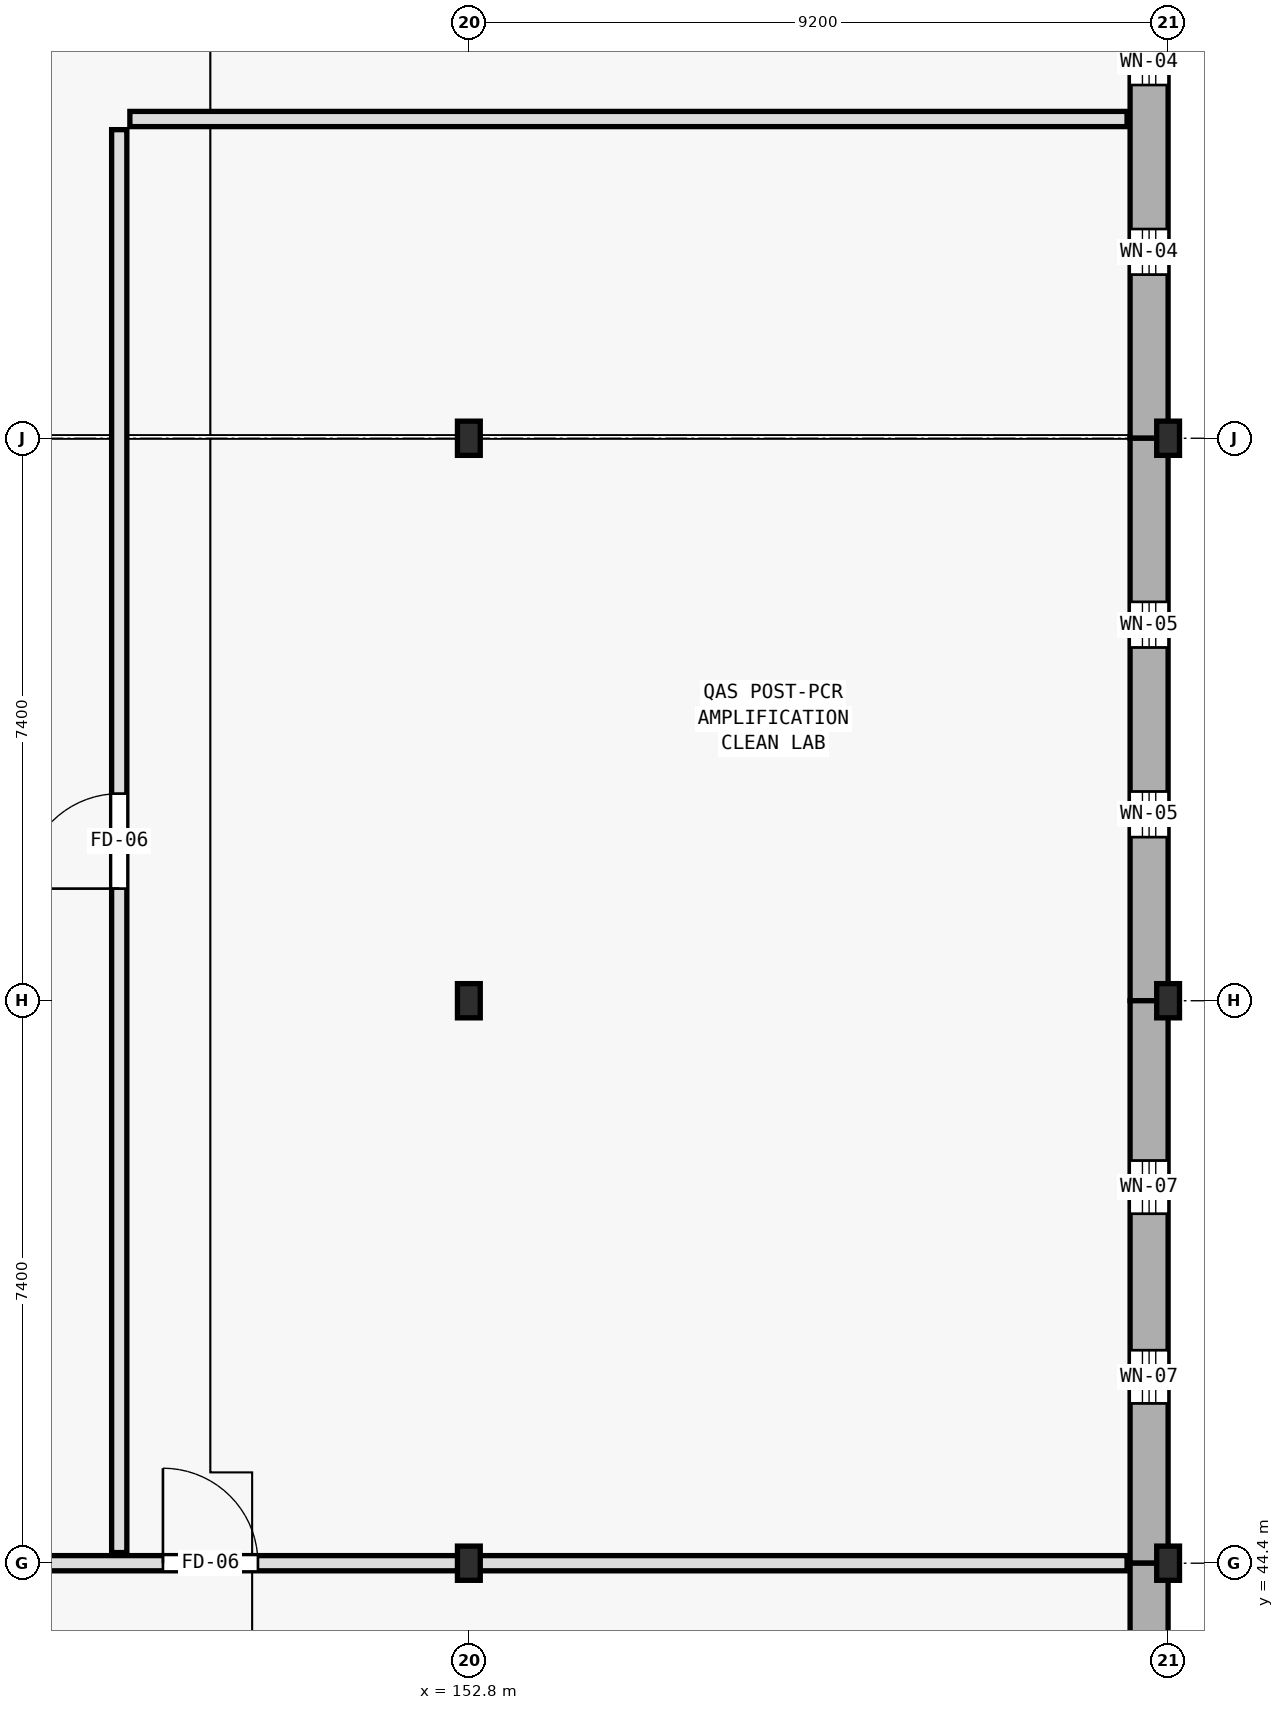
"""IFC4 building model, lengths in metres.
Left out: names, types, materials, properties, quantities, classifications, styles, units other than length and angle.
Written with IfcOpenShell. Run it as: python <this file> out.ifc"""

import sys

from ifc_helpers import new_model, si_unit, direction, frame, frame_2d, origin, origin_2d, place, context, subcontext, project, spatial, rectangle, i_section, extrude, element, fill, save


model = new_model("IFC4")
c1 = context("Model", 3, precision=1e-05, world=origin(), true_north=direction((0.0, 1.0)))
c2 = subcontext(c1, "Body", "Model", "MODEL_VIEW")
j1 = project(units=[si_unit("LENGTHUNIT", "METRE"), si_unit("PLANEANGLEUNIT", "RADIAN")], contexts=[c1])
p1 = place(None, origin())
s1 = spatial("IfcSite", under=j1, at=p1, CompositionType="ELEMENT")
p2 = place(p1, origin())
s2 = spatial("IfcBuilding", under=s1, at=p2, CompositionType="ELEMENT")
p3 = place(p2, frame((0.0, 0.0, 9.9)))
s3 = spatial("IfcBuildingStorey", under=s2, at=p3, CompositionType="ELEMENT", Elevation=9.9)
for number, where, z_axis, x_axis in (
    (1, (152.8, 44.4, 0.0), (0.0, 0.0, 1.0), (1.0, 0.0, 0.0)),
    (2, (152.8, 51.8, 0.0), (0.0, 0.0, 1.0), (1.0, 0.0, 0.0)),
    (3, (152.8, 59.2, 0.0), (0.0, 0.0, 1.0), (1.0, 0.0, 0.0)),
    (4, (162.0, 44.4, 0.0), (0.0, 0.0, 1.0), (1.0, 0.0, 0.0)),
    (5, (162.0, 51.8, 0.0), (0.0, 0.0, 1.0), (1.0, 0.0, 0.0)),
    (6, (162.0, 59.2, 0.0), (0.0, 0.0, 1.0), (1.0, 0.0, 0.0)),
):
    element("IfcColumn", number, at=place(p3, frame(where, z_axis=z_axis, x_axis=x_axis)), inside=s3, PredefinedType="COLUMN", context=c2, shape_type="SweptSolid", body=[
        extrude(i_section(OverallWidth=0.3, OverallDepth=0.45, WebThickness=0.014, FlangeThickness=0.026, FilletRadius=0.027, at=origin_2d()), origin(), (0.0, 0.0, 1.0), 4.2),
    ])
p4 = place(p3, frame((161.75, 66.6, 0.0), z_axis=(0.0, 0.0, 1.0), x_axis=(0.0, -1.0, 0.0)))
e7 = element("IfcWall", 7, at=p4, inside=s3, PredefinedType="STANDARD", context=c2, shape_type="SweptSolid", body=[
    extrude(rectangle(XDim=7.4, YDim=0.5, at=frame_2d((3.7, 0.0))), origin(), (0.0, 0.0, 1.0), 3.955),
])
p5 = place(p4, frame((2.153, 0.0, 0.9)))
e8 = element("IfcOpeningElement", 8, at=p5, cuts=e7, PredefinedType="OPENING", context=c2, shape_type="SweptSolid", body=[
    extrude(rectangle(XDim=0.6, YDim=1.85, at=frame_2d((0.3, 0.925))), frame((0.0, 0.26, 0.0), z_axis=(0.0, -1.0, 0.0), x_axis=(1.0, 0.0, 0.0)), (0.0, 0.0, 1.0), 0.52),
])
p6 = place(p4, frame((4.647, 0.0, 0.9)))
e9 = element("IfcOpeningElement", 9, at=p6, cuts=e7, PredefinedType="OPENING", context=c2, shape_type="SweptSolid", body=[
    extrude(rectangle(XDim=0.6, YDim=1.85, at=frame_2d((0.3, 0.925))), frame((0.0, 0.26, 0.0), z_axis=(0.0, -1.0, 0.0), x_axis=(1.0, 0.0, 0.0)), (0.0, 0.0, 1.0), 0.52),
])
p7 = place(p3, frame((161.75, 59.2, 0.0), z_axis=(0.0, 0.0, 1.0), x_axis=(0.0, -1.0, 0.0)))
e10 = element("IfcWall", 10, at=p7, inside=s3, PredefinedType="STANDARD", context=c2, shape_type="SweptSolid", body=[
    extrude(rectangle(XDim=7.4, YDim=0.5, at=frame_2d((3.7, 0.0))), origin(), (0.0, 0.0, 1.0), 3.955),
])
p8 = place(p7, frame((2.153, 0.0, 0.9)))
e11 = element("IfcOpeningElement", 11, at=p8, cuts=e10, PredefinedType="OPENING", context=c2, shape_type="SweptSolid", body=[
    extrude(rectangle(XDim=0.6, YDim=2.2, at=frame_2d((0.3, 1.1))), frame((0.0, 0.26, 0.0), z_axis=(0.0, -1.0, 0.0), x_axis=(1.0, 0.0, 0.0)), (0.0, 0.0, 1.0), 0.52),
])
p9 = place(p7, frame((4.647, 0.0, 0.9)))
e12 = element("IfcOpeningElement", 12, at=p9, cuts=e10, PredefinedType="OPENING", context=c2, shape_type="SweptSolid", body=[
    extrude(rectangle(XDim=0.6, YDim=2.2, at=frame_2d((0.3, 1.1))), frame((0.0, 0.26, 0.0), z_axis=(0.0, -1.0, 0.0), x_axis=(1.0, 0.0, 0.0)), (0.0, 0.0, 1.0), 0.52),
])
p10 = place(p3, frame((161.75, 51.8, 0.0), z_axis=(0.0, 0.0, 1.0), x_axis=(0.0, -1.0, 0.0)))
e13 = element("IfcWall", 13, at=p10, inside=s3, PredefinedType="STANDARD", context=c2, shape_type="SweptSolid", body=[
    extrude(rectangle(XDim=7.4, YDim=0.5, at=frame_2d((3.7, 0.0))), origin(), (0.0, 0.0, 1.0), 3.955),
])
p11 = place(p10, frame((2.103, 0.0, 1.35)))
e14 = element("IfcOpeningElement", 14, at=p11, cuts=e13, PredefinedType="OPENING", context=c2, shape_type="SweptSolid", body=[
    extrude(rectangle(XDim=0.7, YDim=1.6, at=frame_2d((0.35, 0.8))), frame((0.0, 0.26, 0.0), z_axis=(0.0, -1.0, 0.0), x_axis=(1.0, 0.0, 0.0)), (0.0, 0.0, 1.0), 0.52),
])
p12 = place(p10, frame((4.597, 0.0, 1.35)))
e15 = element("IfcOpeningElement", 15, at=p12, cuts=e13, PredefinedType="OPENING", context=c2, shape_type="SweptSolid", body=[
    extrude(rectangle(XDim=0.7, YDim=1.6, at=frame_2d((0.35, 0.8))), frame((0.0, 0.26, 0.0), z_axis=(0.0, -1.0, 0.0), x_axis=(1.0, 0.0, 0.0)), (0.0, 0.0, 1.0), 0.52),
])
p13 = place(p3, frame((161.75, 44.4, 0.0), z_axis=(0.0, 0.0, 1.0), x_axis=(0.0, -1.0, 0.0)))
e16 = element("IfcWall", 16, at=p13, inside=s3, PredefinedType="STANDARD", context=c2, shape_type="SweptSolid", body=[
    extrude(rectangle(XDim=7.4, YDim=0.5, at=frame_2d((3.7, 0.0))), origin(), (0.0, 0.0, 1.0), 3.92),
])
p14 = place(p13, frame((2.103, 0.0, 0.9)))
e17 = element("IfcOpeningElement", 17, at=p14, cuts=e16, PredefinedType="OPENING", context=c2, shape_type="SweptSolid", body=[
    extrude(rectangle(XDim=0.7, YDim=2.0, at=frame_2d((0.35, 1.0))), frame((0.0, 0.26, 0.0), z_axis=(0.0, -1.0, 0.0), x_axis=(1.0, 0.0, 0.0)), (0.0, 0.0, 1.0), 0.52),
])
p15 = place(p13, frame((4.597, 0.0, 0.9)))
e18 = element("IfcOpeningElement", 18, at=p15, cuts=e16, PredefinedType="OPENING", context=c2, shape_type="SweptSolid", body=[
    extrude(rectangle(XDim=0.7, YDim=2.0, at=frame_2d((0.35, 1.0))), frame((0.0, 0.26, 0.0), z_axis=(0.0, -1.0, 0.0), x_axis=(1.0, 0.0, 0.0)), (0.0, 0.0, 1.0), 0.52),
])
p16 = place(p3, frame((137.34, 44.4, 0.0), z_axis=(0.0, 0.0, 1.0), x_axis=(1.0, 0.0, 0.0)))
e19 = element("IfcWall", 19, at=p16, inside=s3, PredefinedType="STANDARD", context=c2, shape_type="SweptSolid", body=[
    extrude(rectangle(XDim=24.12, YDim=0.2, at=frame_2d((12.06, 0.0))), origin(), (0.0, 0.0, 1.0), 3.35),
])
p17 = place(p16, frame((11.435, 0.0, 0.0)))
e20 = element("IfcOpeningElement", 20, at=p17, cuts=e19, PredefinedType="OPENING", context=c2, shape_type="SweptSolid", body=[
    extrude(rectangle(XDim=1.25, YDim=2.3, at=frame_2d((0.625, 1.15))), frame((0.0, 0.11, 0.0), z_axis=(0.0, -1.0, 0.0), x_axis=(1.0, 0.0, 0.0)), (0.0, 0.0, 1.0), 0.22),
])
p18 = place(p3, frame((148.34, 63.4, 0.0), z_axis=(0.0, 0.0, 1.0), x_axis=(1.0, 0.0, 0.0)))
e21 = element("IfcWall", 21, at=p18, inside=s3, PredefinedType="STANDARD", context=c2, shape_type="SweptSolid", body=[
    extrude(rectangle(XDim=13.12, YDim=0.2, at=frame_2d((6.56, 0.0))), origin(), (0.0, 0.0, 1.0), 3.445),
])
p19 = place(p3, frame((148.2, 44.54, 0.0), z_axis=(0.0, 0.0, 1.0), x_axis=(0.0, 1.0, 0.0)))
e22 = element("IfcWall", 22, at=p19, inside=s3, PredefinedType="STANDARD", context=c2, shape_type="SweptSolid", body=[
    extrude(rectangle(XDim=18.72, YDim=0.2, at=frame_2d((9.36, 0.0))), origin(), (0.0, 0.0, 1.0), 3.35),
])
p20 = place(p19, frame((8.735, 0.0, 0.0)))
e23 = element("IfcOpeningElement", 23, at=p20, cuts=e22, PredefinedType="OPENING", context=c2, shape_type="SweptSolid", body=[
    extrude(rectangle(XDim=1.25, YDim=2.3, at=frame_2d((0.625, 1.15))), frame((0.0, 0.11, 0.0), z_axis=(0.0, -1.0, 0.0), x_axis=(1.0, 0.0, 0.0)), (0.0, 0.0, 1.0), 0.22),
])
p21 = place(p5, origin())
e24 = element("IfcWindow", 24, at=p21, inside=s3, PartitioningType="SINGLE_PANEL", PredefinedType="WINDOW", context=c2, shape_type="SweptSolid", body=[
    extrude(rectangle(XDim=0.6, YDim=1.85, at=frame_2d((0.3, 0.925))), frame((0.0, 0.03, 0.0), z_axis=(0.0, -1.0, 0.0), x_axis=(1.0, 0.0, 0.0)), (0.0, 0.0, 1.0), 0.06),
])
fill(e8, e24)
p22 = place(p6, origin())
e25 = element("IfcWindow", 25, at=p22, inside=s3, PartitioningType="SINGLE_PANEL", PredefinedType="WINDOW", context=c2, shape_type="SweptSolid", body=[
    extrude(rectangle(XDim=0.6, YDim=1.85, at=frame_2d((0.3, 0.925))), frame((0.0, 0.03, 0.0), z_axis=(0.0, -1.0, 0.0), x_axis=(1.0, 0.0, 0.0)), (0.0, 0.0, 1.0), 0.06),
])
fill(e9, e25)
p23 = place(p8, origin())
e26 = element("IfcWindow", 26, at=p23, inside=s3, PartitioningType="SINGLE_PANEL", PredefinedType="WINDOW", context=c2, shape_type="SweptSolid", body=[
    extrude(rectangle(XDim=0.6, YDim=2.2, at=frame_2d((0.3, 1.1))), frame((0.0, 0.03, 0.0), z_axis=(0.0, -1.0, 0.0), x_axis=(1.0, 0.0, 0.0)), (0.0, 0.0, 1.0), 0.06),
])
fill(e11, e26)
p24 = place(p9, origin())
e27 = element("IfcWindow", 27, at=p24, inside=s3, PartitioningType="SINGLE_PANEL", PredefinedType="WINDOW", context=c2, shape_type="SweptSolid", body=[
    extrude(rectangle(XDim=0.6, YDim=2.2, at=frame_2d((0.3, 1.1))), frame((0.0, 0.03, 0.0), z_axis=(0.0, -1.0, 0.0), x_axis=(1.0, 0.0, 0.0)), (0.0, 0.0, 1.0), 0.06),
])
fill(e12, e27)
p25 = place(p11, origin())
e28 = element("IfcWindow", 28, at=p25, inside=s3, PartitioningType="SINGLE_PANEL", PredefinedType="WINDOW", context=c2, shape_type="SweptSolid", body=[
    extrude(rectangle(XDim=0.7, YDim=1.6, at=frame_2d((0.35, 0.8))), frame((0.0, 0.03, 0.0), z_axis=(0.0, -1.0, 0.0), x_axis=(1.0, 0.0, 0.0)), (0.0, 0.0, 1.0), 0.06),
])
fill(e14, e28)
p26 = place(p12, origin())
e29 = element("IfcWindow", 29, at=p26, inside=s3, PartitioningType="SINGLE_PANEL", PredefinedType="WINDOW", context=c2, shape_type="SweptSolid", body=[
    extrude(rectangle(XDim=0.7, YDim=1.6, at=frame_2d((0.35, 0.8))), frame((0.0, 0.03, 0.0), z_axis=(0.0, -1.0, 0.0), x_axis=(1.0, 0.0, 0.0)), (0.0, 0.0, 1.0), 0.06),
])
fill(e15, e29)
p27 = place(p17, origin())
e30 = element("IfcDoor", 30, at=p27, inside=s3, OperationType="SINGLE_SWING_LEFT", PredefinedType="DOOR", context=c2, shape_type="SweptSolid", body=[
    extrude(rectangle(XDim=1.25, YDim=2.3, at=frame_2d((0.625, 1.15))), frame((0.0, 0.025, 0.0), z_axis=(0.0, -1.0, 0.0), x_axis=(1.0, 0.0, 0.0)), (0.0, 0.0, 1.0), 0.05),
])
fill(e20, e30)
p28 = place(p20, origin())
e31 = element("IfcDoor", 31, at=p28, inside=s3, OperationType="SINGLE_SWING_LEFT", PredefinedType="DOOR", context=c2, shape_type="SweptSolid", body=[
    extrude(rectangle(XDim=1.25, YDim=2.3, at=frame_2d((0.625, 1.15))), frame((0.0, 0.025, 0.0), z_axis=(0.0, -1.0, 0.0), x_axis=(1.0, 0.0, 0.0)), (0.0, 0.0, 1.0), 0.05),
])
fill(e23, e31)
save(model, sys.argv[1])
